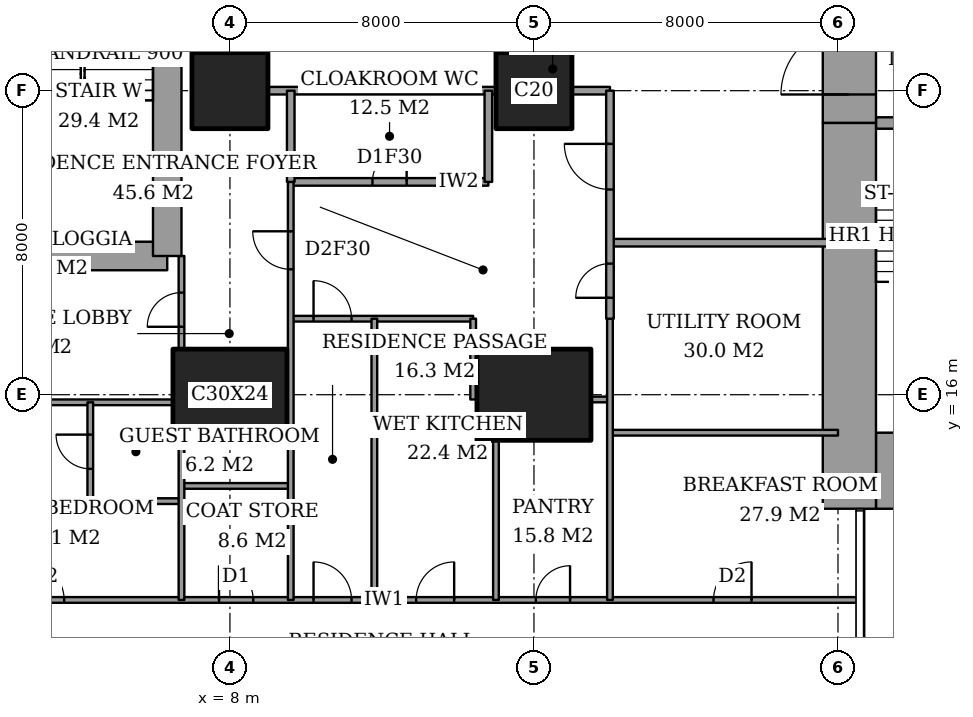
"""IFC4 building model, lengths in metres.
Left out: names, types, materials, properties, quantities, classifications, styles, units other than length and angle.
Written with IfcOpenShell. Run it as: python <this file> out.ifc"""

import sys

from ifc_helpers import new_model, si_unit, direction, frame, frame_2d, origin, origin_2d, place, context, subcontext, project, spatial, rectangle, extrude, element, fill, save


model = new_model("IFC4")
c1 = context("Model", 3, precision=1e-05, world=origin(), true_north=direction((0.0, 1.0)))
c2 = subcontext(c1, "Body", "Model", "MODEL_VIEW")
j1 = project(units=[si_unit("LENGTHUNIT", "METRE"), si_unit("PLANEANGLEUNIT", "RADIAN")], contexts=[c1])
p1 = place(None, origin())
s1 = spatial("IfcSite", under=j1, at=p1, CompositionType="ELEMENT")
p2 = place(p1, origin())
s2 = spatial("IfcBuilding", under=s1, at=p2, CompositionType="ELEMENT")
p3 = place(p2, frame((0.0, 0.0, 107.0)))
s3 = spatial("IfcBuildingStorey", under=s2, at=p3, CompositionType="ELEMENT", Elevation=107.0)
p4 = place(p3, frame((8.0, 16.0, 0.0), z_axis=(0.0, 0.0, 1.0), x_axis=(1.0, 0.0, 0.0)))
e1 = element("IfcColumn", 1, at=p4, inside=s3, PredefinedType="COLUMN", context=c2, shape_type="SweptSolid", body=[
    extrude(rectangle(XDim=3.0, YDim=2.4, at=origin_2d()), origin(), (0.0, 0.0, 1.0), 3.6),
])
p5 = place(p3, frame((8.0, 24.0, 0.0), z_axis=(0.0, 0.0, 1.0), x_axis=(1.0, 0.0, 0.0)))
e2 = element("IfcColumn", 2, at=p5, inside=s3, PredefinedType="COLUMN", context=c2, shape_type="SweptSolid", body=[
    extrude(rectangle(XDim=2.0, YDim=2.0, at=origin_2d()), origin(), (0.0, 0.0, 1.0), 3.6),
])
p6 = place(p3, frame((16.0, 16.0, 0.0), z_axis=(0.0, 0.0, 1.0), x_axis=(1.0, 0.0, 0.0)))
e3 = element("IfcColumn", 3, at=p6, inside=s3, PredefinedType="COLUMN", context=c2, shape_type="SweptSolid", body=[
    extrude(rectangle(XDim=3.0, YDim=2.4, at=origin_2d()), origin(), (0.0, 0.0, 1.0), 3.6),
])
p7 = place(p3, frame((16.0, 24.0, 0.0), z_axis=(0.0, 0.0, 1.0), x_axis=(1.0, 0.0, 0.0)))
e4 = element("IfcColumn", 4, at=p7, inside=s3, PredefinedType="COLUMN", context=c2, shape_type="SweptSolid", body=[
    extrude(rectangle(XDim=2.0, YDim=2.0, at=origin_2d()), origin(), (0.0, 0.0, 1.0), 3.6),
])
p8 = place(p3, frame((25.0, 14.0, 0.0), z_axis=(0.0, 0.0, 1.0), x_axis=(1.0, 0.0, 0.0)))
e5 = element("IfcWall", 5, at=p8, inside=s3, PredefinedType="SHEAR", context=c2, shape_type="SweptSolid", body=[
    extrude(rectangle(XDim=3.15, YDim=2.0, at=frame_2d((1.575, 0.0))), origin(), (0.0, 0.0, 1.0), 3.6),
])
p9 = place(p3, frame((24.3, 13.0, 0.0), z_axis=(0.0, 0.0, 1.0), x_axis=(0.0, 1.0, 0.0)))
e6 = element("IfcWall", 6, at=p9, inside=s3, PredefinedType="SHEAR", context=c2, shape_type="SweptSolid", body=[
    extrude(rectangle(XDim=10.15, YDim=1.4, at=frame_2d((5.075, 0.0))), origin(), (0.0, 0.0, 1.0), 3.6),
])
p10 = place(p3, frame((24.3, 23.15, 0.0), z_axis=(0.0, 0.0, 1.0), x_axis=(0.0, 1.0, 0.0)))
e7 = element("IfcWall", 7, at=p10, inside=s3, PredefinedType="SHEAR", context=c2, shape_type="SweptSolid", body=[
    extrude(rectangle(XDim=11.85, YDim=1.4, at=frame_2d((5.925, 0.0))), origin(), (0.0, 0.0, 1.0), 3.6),
])
p11 = place(p10, frame((0.75, 0.0, 0.0)))
e8 = element("IfcOpeningElement", 8, at=p11, cuts=e7, PredefinedType="OPENING", context=c2, shape_type="SweptSolid", body=[
    extrude(rectangle(XDim=1.8, YDim=2.4, at=frame_2d((0.9, 1.2))), frame((0.0, 0.71, 0.0), z_axis=(0.0, -1.0, 0.0), x_axis=(1.0, 0.0, 0.0)), (0.0, 0.0, 1.0), 1.42),
])
p12 = place(p3, frame((25.0, 23.15, 0.0), z_axis=(0.0, 0.0, 1.0), x_axis=(1.0, 0.0, 0.0)))
e9 = element("IfcWall", 9, at=p12, inside=s3, PredefinedType="SHEAR", context=c2, shape_type="SweptSolid", body=[
    extrude(rectangle(XDim=3.15, YDim=0.3, at=frame_2d((1.575, 0.0))), origin(), (0.0, 0.0, 1.0), 3.6),
])
p13 = place(p12, frame((0.6, 0.0, 0.0)))
e10 = element("IfcOpeningElement", 10, at=p13, cuts=e9, PredefinedType="OPENING", context=c2, shape_type="SweptSolid", body=[
    extrude(rectangle(XDim=1.0, YDim=2.1, at=frame_2d((0.5, 1.05))), frame((0.0, 0.16, 0.0), z_axis=(0.0, -1.0, 0.0), x_axis=(1.0, 0.0, 0.0)), (0.0, 0.0, 1.0), 0.32),
])
p14 = place(p3, frame((1.9, 19.65, 0.0), z_axis=(0.0, 0.0, 1.0), x_axis=(1.0, 0.0, 0.0)))
e11 = element("IfcWall", 11, at=p14, inside=s3, PredefinedType="SHEAR", context=c2, shape_type="SweptSolid", body=[
    extrude(rectangle(XDim=4.45, YDim=0.75, at=frame_2d((2.225, 0.0))), origin(), (0.0, 0.0, 1.0), 3.6),
])
p15 = place(p3, frame((6.35, 19.65, 0.0), z_axis=(0.0, 0.0, 1.0), x_axis=(0.0, 1.0, 0.0)))
e12 = element("IfcWall", 12, at=p15, inside=s3, PredefinedType="SHEAR", context=c2, shape_type="SweptSolid", body=[
    extrude(rectangle(XDim=8.7, YDim=0.75, at=frame_2d((4.35, 0.0))), origin(), (0.0, 0.0, 1.0), 3.6),
])
p16 = place(p15, frame((6.725, 0.0, 0.0)))
e13 = element("IfcOpeningElement", 13, at=p16, cuts=e12, PredefinedType="OPENING", context=c2, shape_type="SweptSolid", body=[
    extrude(rectangle(XDim=1.0, YDim=2.1, at=frame_2d((0.5, 1.05))), frame((0.0, 0.385, 0.0), z_axis=(0.0, -1.0, 0.0), x_axis=(1.0, 0.0, 0.0)), (0.0, 0.0, 1.0), 0.77),
])
p17 = place(p3, frame((-0.45, 10.6, 0.0), z_axis=(0.0, 0.0, 1.0), x_axis=(1.0, 0.0, 0.0)))
e14 = element("IfcWall", 14, at=p17, inside=s3, PredefinedType="PARTITIONING", context=c2, shape_type="SweptSolid", body=[
    extrude(rectangle(XDim=25.011, YDim=0.15, at=frame_2d((12.505, 0.0))), origin(), (0.0, 0.0, 1.0), 3.35),
])
p18 = place(p17, frame((10.65, 0.0, 0.0)))
e15 = element("IfcOpeningElement", 15, at=p18, cuts=e14, PredefinedType="OPENING", context=c2, shape_type="SweptSolid", body=[
    extrude(rectangle(XDim=1.0, YDim=2.1, at=frame_2d((0.5, 1.05))), frame((0.0, 0.085, 0.0), z_axis=(0.0, -1.0, 0.0), x_axis=(1.0, 0.0, 0.0)), (0.0, 0.0, 1.0), 0.17),
])
p19 = place(p17, frame((3.087, 0.0, 0.0)))
e16 = element("IfcOpeningElement", 16, at=p19, cuts=e14, PredefinedType="OPENING", context=c2, shape_type="SweptSolid", body=[
    extrude(rectangle(XDim=1.0, YDim=2.1, at=frame_2d((0.5, 1.05))), frame((0.0, 0.085, 0.0), z_axis=(0.0, -1.0, 0.0), x_axis=(1.0, 0.0, 0.0)), (0.0, 0.0, 1.0), 0.17),
])
p20 = place(p17, frame((8.163, 0.0, 0.0)))
e17 = element("IfcOpeningElement", 17, at=p20, cuts=e14, PredefinedType="OPENING", context=c2, shape_type="SweptSolid", body=[
    extrude(rectangle(XDim=0.9, YDim=2.1, at=frame_2d((0.45, 1.05))), frame((0.0, 0.085, 0.0), z_axis=(0.0, -1.0, 0.0), x_axis=(1.0, 0.0, 0.0)), (0.0, 0.0, 1.0), 0.17),
])
p21 = place(p17, frame((13.35, 0.0, 0.0)))
e18 = element("IfcOpeningElement", 18, at=p21, cuts=e14, PredefinedType="OPENING", context=c2, shape_type="SweptSolid", body=[
    extrude(rectangle(XDim=1.0, YDim=2.1, at=frame_2d((0.5, 1.05))), frame((0.0, 0.085, 0.0), z_axis=(0.0, -1.0, 0.0), x_axis=(1.0, 0.0, 0.0)), (0.0, 0.0, 1.0), 0.17),
])
p22 = place(p17, frame((16.5, 0.0, 0.0)))
e19 = element("IfcOpeningElement", 19, at=p22, cuts=e14, PredefinedType="OPENING", context=c2, shape_type="SweptSolid", body=[
    extrude(rectangle(XDim=0.9, YDim=2.1, at=frame_2d((0.45, 1.05))), frame((0.0, 0.085, 0.0), z_axis=(0.0, -1.0, 0.0), x_axis=(1.0, 0.0, 0.0)), (0.0, 0.0, 1.0), 0.17),
])
p23 = place(p17, frame((21.175, 0.0, 0.0)))
e20 = element("IfcOpeningElement", 20, at=p23, cuts=e14, PredefinedType="OPENING", context=c2, shape_type="SweptSolid", body=[
    extrude(rectangle(XDim=1.0, YDim=2.1, at=frame_2d((0.5, 1.05))), frame((0.0, 0.085, 0.0), z_axis=(0.0, -1.0, 0.0), x_axis=(1.0, 0.0, 0.0)), (0.0, 0.0, 1.0), 0.17),
])
p24 = place(p3, frame((4.325, 13.2, 0.0), z_axis=(0.0, 0.0, 1.0), x_axis=(1.0, 0.0, 0.0)))
e21 = element("IfcWall", 21, at=p24, inside=s3, PredefinedType="PARTITIONING", context=c2, shape_type="SweptSolid", body=[
    extrude(rectangle(XDim=2.4, YDim=0.15, at=frame_2d((1.2, 0.0))), origin(), (0.0, 0.0, 1.0), 3.35),
])
p25 = place(p3, frame((6.725, 13.6, 0.0), z_axis=(0.0, 0.0, 1.0), x_axis=(1.0, 0.0, 0.0)))
e22 = element("IfcWall", 22, at=p25, inside=s3, PredefinedType="PARTITIONING", context=c2, shape_type="SweptSolid", body=[
    extrude(rectangle(XDim=2.875, YDim=0.15, at=frame_2d((1.438, 0.0))), origin(), (0.0, 0.0, 1.0), 3.35),
])
p26 = place(p3, frame((18.0, 15.0, 0.0), z_axis=(0.0, 0.0, 1.0), x_axis=(1.0, 0.0, 0.0)))
e23 = element("IfcWall", 23, at=p26, inside=s3, PredefinedType="PARTITIONING", context=c2, shape_type="SweptSolid", body=[
    extrude(rectangle(XDim=6.0, YDim=0.15, at=frame_2d((3.0, 0.0))), origin(), (0.0, 0.0, 1.0), 3.35),
])
p27 = place(p3, frame((1.35, 15.8, 0.0), z_axis=(0.0, 0.0, 1.0), x_axis=(1.0, 0.0, 0.0)))
e24 = element("IfcWall", 24, at=p27, inside=s3, PredefinedType="PARTITIONING", context=c2, shape_type="SweptSolid", body=[
    extrude(rectangle(XDim=5.15, YDim=0.15, at=frame_2d((2.575, 0.0))), origin(), (0.0, 0.0, 1.0), 3.35),
])
p28 = place(p3, frame((17.5, 15.875, 0.0), z_axis=(0.0, 0.0, 1.0), x_axis=(1.0, 0.0, 0.0)))
e25 = element("IfcWall", 25, at=p28, inside=s3, PredefinedType="PARTITIONING", context=c2, shape_type="SweptSolid", body=[
    extrude(rectangle(XDim=0.5, YDim=0.15, at=frame_2d((0.25, 0.0))), origin(), (0.0, 0.0, 1.0), 2.634),
])
p29 = place(p3, frame((9.6, 18.0, 0.0), z_axis=(0.0, 0.0, 1.0), x_axis=(1.0, 0.0, 0.0)))
e26 = element("IfcWall", 26, at=p29, inside=s3, PredefinedType="PARTITIONING", context=c2, shape_type="SweptSolid", body=[
    extrude(rectangle(XDim=4.8, YDim=0.15, at=frame_2d((2.4, 0.0))), origin(), (0.0, 0.0, 1.0), 3.35),
])
p30 = place(p29, frame((0.6, 0.0, 0.0)))
e27 = element("IfcOpeningElement", 27, at=p30, cuts=e26, PredefinedType="OPENING", context=c2, shape_type="SweptSolid", body=[
    extrude(rectangle(XDim=1.0, YDim=2.1, at=frame_2d((0.5, 1.05))), frame((0.0, 0.085, 0.0), z_axis=(0.0, -1.0, 0.0), x_axis=(1.0, 0.0, 0.0)), (0.0, 0.0, 1.0), 0.17),
])
p31 = place(p3, frame((18.0, 20.0, 0.0), z_axis=(0.0, 0.0, 1.0), x_axis=(1.0, 0.0, 0.0)))
e28 = element("IfcWall", 28, at=p31, inside=s3, PredefinedType="PARTITIONING", context=c2, shape_type="SweptSolid", body=[
    extrude(rectangle(XDim=6.0, YDim=0.2, at=frame_2d((3.0, 0.0))), origin(), (0.0, 0.0, 1.0), 3.35),
])
p32 = place(p3, frame((9.6, 21.6, 0.0), z_axis=(0.0, 0.0, 1.0), x_axis=(1.0, 0.0, 0.0)))
e29 = element("IfcWall", 29, at=p32, inside=s3, PredefinedType="PARTITIONING", context=c2, shape_type="SweptSolid", body=[
    extrude(rectangle(XDim=5.2, YDim=0.2, at=frame_2d((2.6, 0.0))), origin(), (0.0, 0.0, 1.0), 3.35),
])
p33 = place(p32, frame((2.15, 0.0, 0.0)))
e30 = element("IfcOpeningElement", 30, at=p33, cuts=e29, PredefinedType="OPENING", context=c2, shape_type="SweptSolid", body=[
    extrude(rectangle(XDim=0.9, YDim=2.1, at=frame_2d((0.45, 1.05))), frame((0.0, 0.11, 0.0), z_axis=(0.0, -1.0, 0.0), x_axis=(1.0, 0.0, 0.0)), (0.0, 0.0, 1.0), 0.22),
])
p34 = place(p3, frame((9.0, 24.0, 0.0), z_axis=(0.0, 0.0, 1.0), x_axis=(1.0, 0.0, 0.0)))
e31 = element("IfcWall", 31, at=p34, inside=s3, PredefinedType="PARTITIONING", context=c2, shape_type="SweptSolid", body=[
    extrude(rectangle(XDim=6.0, YDim=0.2, at=frame_2d((3.0, 0.0))), origin(), (0.0, 0.0, 1.0), 3.35),
])
p35 = place(p3, frame((17.0, 24.0, 0.0), z_axis=(0.0, 0.0, 1.0), x_axis=(1.0, 0.0, 0.0)))
e32 = element("IfcWall", 32, at=p35, inside=s3, PredefinedType="PARTITIONING", context=c2, shape_type="SweptSolid", body=[
    extrude(rectangle(XDim=1.0, YDim=0.2, at=frame_2d((0.5, 0.0))), origin(), (0.0, 0.0, 1.0), 3.35),
])
p36 = place(p3, frame((4.325, 13.2, 0.0), z_axis=(0.0, 0.0, 1.0), x_axis=(0.0, 1.0, 0.0)))
e33 = element("IfcWall", 33, at=p36, inside=s3, PredefinedType="PARTITIONING", context=c2, shape_type="SweptSolid", body=[
    extrude(rectangle(XDim=2.6, YDim=0.15, at=frame_2d((1.3, 0.0))), origin(), (0.0, 0.0, 1.0), 3.35),
])
p37 = place(p36, frame((0.85, 0.0, 0.0)))
e34 = element("IfcOpeningElement", 34, at=p37, cuts=e33, PredefinedType="OPENING", context=c2, shape_type="SweptSolid", body=[
    extrude(rectangle(XDim=0.9, YDim=2.1, at=frame_2d((0.45, 1.05))), frame((0.0, 0.085, 0.0), z_axis=(0.0, -1.0, 0.0), x_axis=(1.0, 0.0, 0.0)), (0.0, 0.0, 1.0), 0.17),
])
p38 = place(p3, frame((6.725, 10.6, 0.0), z_axis=(0.0, 0.0, 1.0), x_axis=(0.0, 1.0, 0.0)))
e35 = element("IfcWall", 35, at=p38, inside=s3, PredefinedType="PARTITIONING", context=c2, shape_type="SweptSolid", body=[
    extrude(rectangle(XDim=4.2, YDim=0.15, at=frame_2d((2.1, 0.0))), origin(), (0.0, 0.0, 1.0), 3.35),
])
p39 = place(p3, frame((6.725, 17.2, 0.0), z_axis=(0.0, 0.0, 1.0), x_axis=(0.0, 1.0, 0.0)))
e36 = element("IfcWall", 36, at=p39, inside=s3, PredefinedType="PARTITIONING", context=c2, shape_type="SweptSolid", body=[
    extrude(rectangle(XDim=2.45, YDim=0.15, at=frame_2d((1.225, 0.0))), origin(), (0.0, 0.0, 1.0), 3.35),
])
p40 = place(p39, frame((0.587, 0.0, 0.0)))
e37 = element("IfcOpeningElement", 37, at=p40, cuts=e36, PredefinedType="OPENING", context=c2, shape_type="SweptSolid", body=[
    extrude(rectangle(XDim=0.9, YDim=2.1, at=frame_2d((0.45, 1.05))), frame((0.0, 0.085, 0.0), z_axis=(0.0, -1.0, 0.0), x_axis=(1.0, 0.0, 0.0)), (0.0, 0.0, 1.0), 0.17),
])
p41 = place(p3, frame((9.6, 21.6, 0.0), z_axis=(0.0, 0.0, 1.0), x_axis=(0.0, 1.0, 0.0)))
e38 = element("IfcWall", 38, at=p41, inside=s3, PredefinedType="PARTITIONING", context=c2, shape_type="SweptSolid", body=[
    extrude(rectangle(XDim=2.4, YDim=0.2, at=frame_2d((1.2, 0.0))), origin(), (0.0, 0.0, 1.0), 3.35),
])
p42 = place(p3, frame((9.6, 10.6, 0.0), z_axis=(0.0, 0.0, 1.0), x_axis=(0.0, 1.0, 0.0)))
e39 = element("IfcWall", 39, at=p42, inside=s3, PredefinedType="PARTITIONING", context=c2, shape_type="SweptSolid", body=[
    extrude(rectangle(XDim=11.0, YDim=0.15, at=frame_2d((5.5, 0.0))), origin(), (0.0, 0.0, 1.0), 3.35),
])
p43 = place(p42, frame((8.7, 0.0, 0.0)))
e40 = element("IfcOpeningElement", 40, at=p43, cuts=e39, PredefinedType="OPENING", context=c2, shape_type="SweptSolid", body=[
    extrude(rectangle(XDim=1.0, YDim=2.1, at=frame_2d((0.5, 1.05))), frame((0.0, 0.085, 0.0), z_axis=(0.0, -1.0, 0.0), x_axis=(1.0, 0.0, 0.0)), (0.0, 0.0, 1.0), 0.17),
])
p44 = place(p3, frame((11.8, 10.6, 0.0), z_axis=(0.0, 0.0, 1.0), x_axis=(0.0, 1.0, 0.0)))
e41 = element("IfcWall", 41, at=p44, inside=s3, PredefinedType="PARTITIONING", context=c2, shape_type="SweptSolid", body=[
    extrude(rectangle(XDim=7.4, YDim=0.15, at=frame_2d((3.7, 0.0))), origin(), (0.0, 0.0, 1.0), 3.35),
])
p45 = place(p3, frame((14.4, 15.875, 0.0), z_axis=(0.0, 0.0, 1.0), x_axis=(0.0, 1.0, 0.0)))
e42 = element("IfcWall", 42, at=p45, inside=s3, PredefinedType="PARTITIONING", context=c2, shape_type="SweptSolid", body=[
    extrude(rectangle(XDim=2.125, YDim=0.15, at=frame_2d((1.062, 0.0))), origin(), (0.0, 0.0, 1.0), 3.35),
])
p46 = place(p3, frame((14.8, 21.6, 0.0), z_axis=(0.0, 0.0, 1.0), x_axis=(0.0, 1.0, 0.0)))
e43 = element("IfcWall", 43, at=p46, inside=s3, PredefinedType="PARTITIONING", context=c2, shape_type="SweptSolid", body=[
    extrude(rectangle(XDim=2.4, YDim=0.2, at=frame_2d((1.2, 0.0))), origin(), (0.0, 0.0, 1.0), 3.35),
])
p47 = place(p3, frame((15.0, 10.6, 0.0), z_axis=(0.0, 0.0, 1.0), x_axis=(0.0, 1.0, 0.0)))
e44 = element("IfcWall", 44, at=p47, inside=s3, PredefinedType="PARTITIONING", context=c2, shape_type="SweptSolid", body=[
    extrude(rectangle(XDim=4.2, YDim=0.15, at=frame_2d((2.1, 0.0))), origin(), (0.0, 0.0, 1.0), 3.35),
])
p48 = place(p3, frame((18.0, 18.0, 0.0), z_axis=(0.0, 0.0, 1.0), x_axis=(0.0, 1.0, 0.0)))
e45 = element("IfcWall", 45, at=p48, inside=s3, PredefinedType="PARTITIONING", context=c2, shape_type="SweptSolid", body=[
    extrude(rectangle(XDim=6.0, YDim=0.2, at=frame_2d((3.0, 0.0))), origin(), (0.0, 0.0, 1.0), 3.35),
])
p49 = place(p48, frame((3.4, 0.0, 0.0)))
e46 = element("IfcOpeningElement", 46, at=p49, cuts=e45, PredefinedType="OPENING", context=c2, shape_type="SweptSolid", body=[
    extrude(rectangle(XDim=1.2, YDim=2.4, at=frame_2d((0.6, 1.2))), frame((0.0, 0.11, 0.0), z_axis=(0.0, -1.0, 0.0), x_axis=(1.0, 0.0, 0.0)), (0.0, 0.0, 1.0), 0.22),
])
p50 = place(p48, frame((0.55, 0.0, 0.0)))
e47 = element("IfcOpeningElement", 47, at=p50, cuts=e45, PredefinedType="OPENING", context=c2, shape_type="SweptSolid", body=[
    extrude(rectangle(XDim=0.9, YDim=2.1, at=frame_2d((0.45, 1.05))), frame((0.0, 0.11, 0.0), z_axis=(0.0, -1.0, 0.0), x_axis=(1.0, 0.0, 0.0)), (0.0, 0.0, 1.0), 0.22),
])
p51 = place(p3, frame((18.0, 10.6, 0.0), z_axis=(0.0, 0.0, 1.0), x_axis=(0.0, 1.0, 0.0)))
e48 = element("IfcWall", 48, at=p51, inside=s3, PredefinedType="PARTITIONING", context=c2, shape_type="SweptSolid", body=[
    extrude(rectangle(XDim=7.4, YDim=0.15, at=frame_2d((3.7, 0.0))), origin(), (0.0, 0.0, 1.0), 3.35),
])
p52 = place(p18, origin())
e49 = element("IfcDoor", 49, at=p52, inside=s3, OperationType="SINGLE_SWING_RIGHT", PredefinedType="DOOR", context=c2, shape_type="SweptSolid", body=[
    extrude(rectangle(XDim=1.0, YDim=2.1, at=frame_2d((0.5, 1.05))), frame((0.0, 0.025, 0.0), z_axis=(0.0, -1.0, 0.0), x_axis=(1.0, 0.0, 0.0)), (0.0, 0.0, 1.0), 0.05),
])
fill(e15, e49)
p53 = place(p37, origin())
e50 = element("IfcDoor", 50, at=p53, inside=s3, OperationType="SINGLE_SWING_LEFT", PredefinedType="DOOR", context=c2, shape_type="SweptSolid", body=[
    extrude(rectangle(XDim=0.9, YDim=2.1, at=frame_2d((0.45, 1.05))), frame((0.0, 0.025, 0.0), z_axis=(0.0, -1.0, 0.0), x_axis=(1.0, 0.0, 0.0)), (0.0, 0.0, 1.0), 0.05),
])
fill(e34, e50)
p54 = place(p19, origin())
e51 = element("IfcDoor", 51, at=p54, inside=s3, OperationType="SINGLE_SWING_RIGHT", PredefinedType="DOOR", context=c2, shape_type="SweptSolid", body=[
    extrude(rectangle(XDim=1.0, YDim=2.1, at=frame_2d((0.5, 1.05))), frame((0.0, 0.025, 0.0), z_axis=(0.0, -1.0, 0.0), x_axis=(1.0, 0.0, 0.0)), (0.0, 0.0, 1.0), 0.05),
])
fill(e16, e51)
p55 = place(p40, origin())
e52 = element("IfcDoor", 52, at=p55, inside=s3, OperationType="SINGLE_SWING_RIGHT", PredefinedType="DOOR", context=c2, shape_type="SweptSolid", body=[
    extrude(rectangle(XDim=0.9, YDim=2.1, at=frame_2d((0.45, 1.05))), frame((0.0, 0.025, 0.0), z_axis=(0.0, -1.0, 0.0), x_axis=(1.0, 0.0, 0.0)), (0.0, 0.0, 1.0), 0.05),
])
fill(e37, e52)
p56 = place(p20, origin())
e53 = element("IfcDoor", 53, at=p56, inside=s3, OperationType="SINGLE_SWING_RIGHT", PredefinedType="DOOR", context=c2, shape_type="SweptSolid", body=[
    extrude(rectangle(XDim=0.9, YDim=2.1, at=frame_2d((0.45, 1.05))), frame((0.0, 0.025, 0.0), z_axis=(0.0, -1.0, 0.0), x_axis=(1.0, 0.0, 0.0)), (0.0, 0.0, 1.0), 0.05),
])
fill(e17, e53)
p57 = place(p43, origin())
e54 = element("IfcDoor", 54, at=p57, inside=s3, OperationType="SINGLE_SWING_LEFT", PredefinedType="DOOR", context=c2, shape_type="SweptSolid", body=[
    extrude(rectangle(XDim=1.0, YDim=2.1, at=frame_2d((0.5, 1.05))), frame((0.0, 0.025, 0.0), z_axis=(0.0, -1.0, 0.0), x_axis=(1.0, 0.0, 0.0)), (0.0, 0.0, 1.0), 0.05),
])
fill(e40, e54)
p58 = place(p33, origin())
e55 = element("IfcDoor", 55, at=p58, inside=s3, OperationType="SINGLE_SWING_LEFT", PredefinedType="DOOR", context=c2, shape_type="SweptSolid", body=[
    extrude(rectangle(XDim=0.9, YDim=2.1, at=frame_2d((0.45, 1.05))), frame((0.0, 0.025, 0.0), z_axis=(0.0, -1.0, 0.0), x_axis=(1.0, 0.0, 0.0)), (0.0, 0.0, 1.0), 0.05),
])
fill(e30, e55)
p59 = place(p49, origin())
e56 = element("IfcDoor", 56, at=p59, inside=s3, OperationType="SINGLE_SWING_LEFT", PredefinedType="DOOR", context=c2, shape_type="SweptSolid", body=[
    extrude(rectangle(XDim=1.2, YDim=2.4, at=frame_2d((0.6, 1.2))), frame((0.0, 0.025, 0.0), z_axis=(0.0, -1.0, 0.0), x_axis=(1.0, 0.0, 0.0)), (0.0, 0.0, 1.0), 0.05),
])
fill(e46, e56)
p60 = place(p30, origin())
e57 = element("IfcDoor", 57, at=p60, inside=s3, OperationType="SINGLE_SWING_RIGHT", PredefinedType="DOOR", context=c2, shape_type="SweptSolid", body=[
    extrude(rectangle(XDim=1.0, YDim=2.1, at=frame_2d((0.5, 1.05))), frame((0.0, 0.025, 0.0), z_axis=(0.0, -1.0, 0.0), x_axis=(1.0, 0.0, 0.0)), (0.0, 0.0, 1.0), 0.05),
])
fill(e27, e57)
p61 = place(p21, origin())
e58 = element("IfcDoor", 58, at=p61, inside=s3, OperationType="SINGLE_SWING_LEFT", PredefinedType="DOOR", context=c2, shape_type="SweptSolid", body=[
    extrude(rectangle(XDim=1.0, YDim=2.1, at=frame_2d((0.5, 1.05))), frame((0.0, 0.025, 0.0), z_axis=(0.0, -1.0, 0.0), x_axis=(1.0, 0.0, 0.0)), (0.0, 0.0, 1.0), 0.05),
])
fill(e18, e58)
p62 = place(p22, origin())
e59 = element("IfcDoor", 59, at=p62, inside=s3, OperationType="SINGLE_SWING_LEFT", PredefinedType="DOOR", context=c2, shape_type="SweptSolid", body=[
    extrude(rectangle(XDim=0.9, YDim=2.1, at=frame_2d((0.45, 1.05))), frame((0.0, 0.025, 0.0), z_axis=(0.0, -1.0, 0.0), x_axis=(1.0, 0.0, 0.0)), (0.0, 0.0, 1.0), 0.05),
])
fill(e19, e59)
p63 = place(p23, origin())
e60 = element("IfcDoor", 60, at=p63, inside=s3, OperationType="SINGLE_SWING_LEFT", PredefinedType="DOOR", context=c2, shape_type="SweptSolid", body=[
    extrude(rectangle(XDim=1.0, YDim=2.1, at=frame_2d((0.5, 1.05))), frame((0.0, 0.025, 0.0), z_axis=(0.0, -1.0, 0.0), x_axis=(1.0, 0.0, 0.0)), (0.0, 0.0, 1.0), 0.05),
])
fill(e20, e60)
p64 = place(p50, origin())
e61 = element("IfcDoor", 61, at=p64, inside=s3, OperationType="SINGLE_SWING_RIGHT", PredefinedType="DOOR", context=c2, shape_type="SweptSolid", body=[
    extrude(rectangle(XDim=0.9, YDim=2.1, at=frame_2d((0.45, 1.05))), frame((0.0, 0.025, 0.0), z_axis=(0.0, -1.0, 0.0), x_axis=(1.0, 0.0, 0.0)), (0.0, 0.0, 1.0), 0.05),
])
fill(e47, e61)
p65 = place(p11, origin())
e62 = element("IfcDoor", 62, at=p65, inside=s3, OperationType="DOUBLE_DOOR_DOUBLE_SWING", PredefinedType="DOOR", context=c2, shape_type="SweptSolid", body=[
    extrude(rectangle(XDim=1.8, YDim=2.4, at=frame_2d((0.9, 1.2))), frame((0.0, 0.025, 0.0), z_axis=(0.0, -1.0, 0.0), x_axis=(1.0, 0.0, 0.0)), (0.0, 0.0, 1.0), 0.05),
])
fill(e8, e62)
save(model, sys.argv[1])
